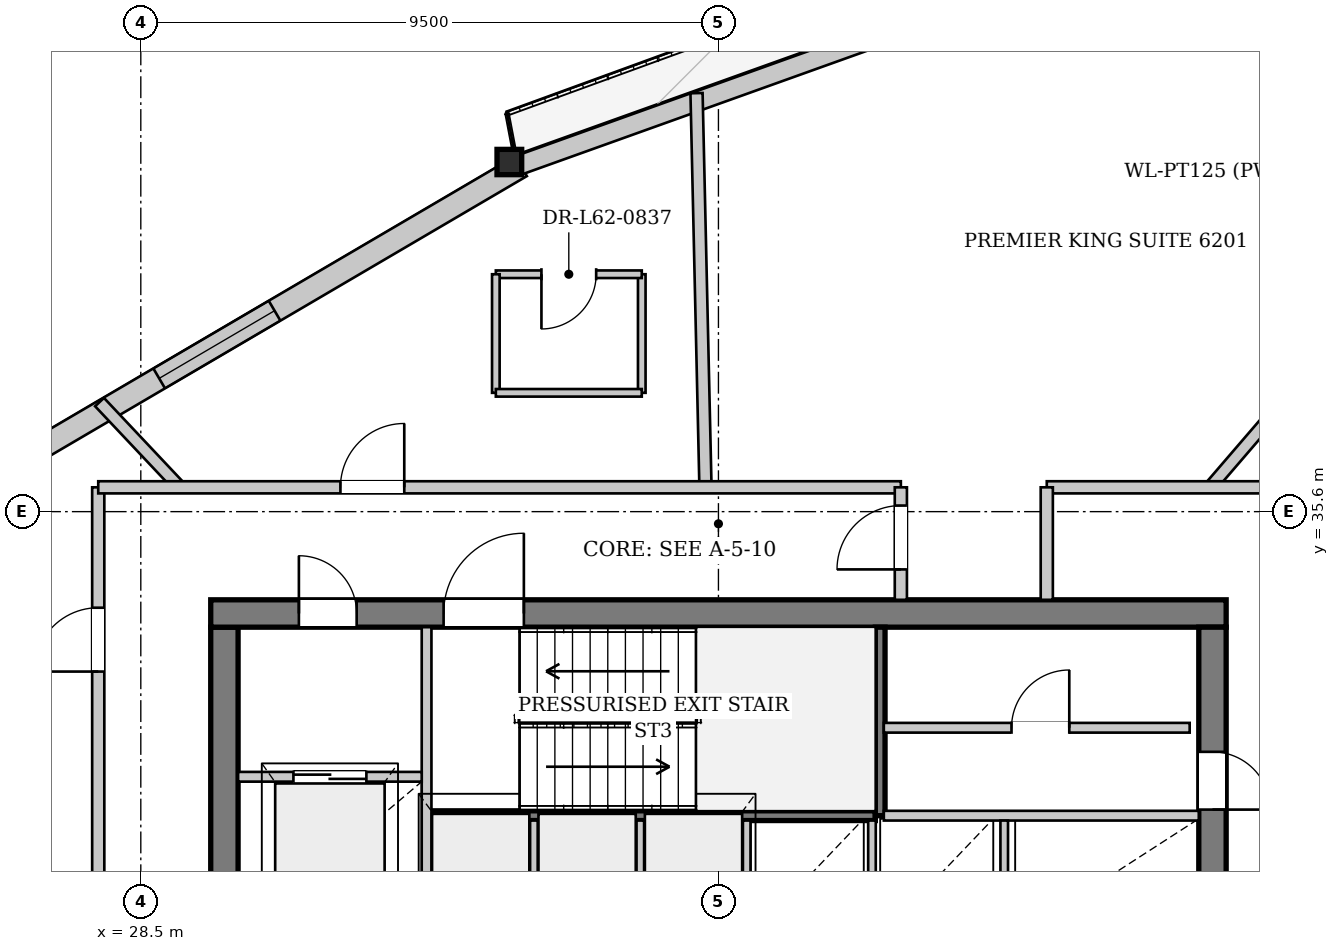
"""IFC4 building model, lengths in metres.
Left out: names, types, materials, properties, quantities, classifications, styles, units other than length and angle.
Written with IfcOpenShell. Run it as: python <this file> out.ifc"""

import sys

from ifc_helpers import new_model, si_unit, direction, frame, frame_2d, origin, origin_2d, place, context, subcontext, project, spatial, rectangle, i_section, extrude, source, transform, mapped, element, fill, save


model = new_model("IFC4")
c1 = context("Model", 3, precision=1e-05, world=origin(), true_north=direction((0.0, 1.0)))
c2 = subcontext(c1, "Body", "Model", "MODEL_VIEW")
j1 = project(units=[si_unit("LENGTHUNIT", "METRE"), si_unit("PLANEANGLEUNIT", "RADIAN")], contexts=[c1])
p1 = place(None, origin())
s1 = spatial("IfcSite", under=j1, at=p1, CompositionType="ELEMENT")
p2 = place(p1, origin())
s2 = spatial("IfcBuilding", under=s1, at=p2, CompositionType="ELEMENT")
p3 = place(p2, frame((0.0, 0.0, 234.5)))
s3 = spatial("IfcBuildingStorey", under=s2, at=p3, CompositionType="ELEMENT", Elevation=234.5)
m1 = source(origin(), c2, "Body", "SweptSolid", [
    extrude(i_section(OverallWidth=0.406, OverallDepth=0.416, WebThickness=0.027, FlangeThickness=0.042, at=origin_2d()), origin(), (0.0, 0.0, 1.0), 3.446),
])
p4 = place(p3, frame((34.657, 41.446, 0.0), z_axis=(-0.055618943406, -0.055831499877, 0.996889851867), x_axis=(0.708454075285, -0.7057569151, 0.0)))
e1 = element("IfcColumn", 1, at=p4, inside=s3, PredefinedType="COLUMN", context=c2, shape_type="MappedRepresentation", body=[
    mapped(m1, transform((0.0, 0.0, 0.0), x_axis=(1.0, 0.0, 0.0), y_axis=(0.0, 1.0, 0.0), z_axis=(0.0, 0.0, 1.0), scale=1.0)),
])
p5 = place(p3, frame((15.502, 29.99, 0.0), z_axis=(0.0, 0.0, 1.0), x_axis=(0.862571881981, 0.505934529772, 0.0)))
e2 = element("IfcWall", 2, at=p5, inside=s3, PredefinedType="SOLIDWALL", context=c2, shape_type="SweptSolid", body=[
    extrude(rectangle(XDim=22.318, YDim=0.38, at=frame_2d((11.159, 0.0))), origin(), (0.0, 0.0, 1.0), 2.872),
])
p6 = place(p5, frame((5.149, 0.0, 0.502)))
e3 = element("IfcOpeningElement", 3, at=p6, cuts=e2, PredefinedType="OPENING", context=c2, shape_type="SweptSolid", body=[
    extrude(rectangle(XDim=2.2, YDim=2.25, at=frame_2d((1.1, 1.125))), frame((0.0, 0.2, 0.0), z_axis=(0.0, -1.0, 0.0), x_axis=(1.0, 0.0, 0.0)), (0.0, 0.0, 1.0), 0.4),
])
p7 = place(p5, frame((15.419, 0.0, 0.502)))
e4 = element("IfcOpeningElement", 4, at=p7, cuts=e2, PredefinedType="OPENING", context=c2, shape_type="SweptSolid", body=[
    extrude(rectangle(XDim=2.2, YDim=2.25, at=frame_2d((1.1, 1.125))), frame((0.0, 0.2, 0.0), z_axis=(0.0, -1.0, 0.0), x_axis=(1.0, 0.0, 0.0)), (0.0, 0.0, 1.0), 0.4),
])
p8 = place(p3, frame((34.711, 41.295, 0.0), z_axis=(0.0, 0.0, 1.0), x_axis=(0.941393680714, 0.337309854455, 0.0)))
e5 = element("IfcWall", 5, at=p8, inside=s3, PredefinedType="SOLIDWALL", context=c2, shape_type="SweptSolid", body=[
    extrude(rectangle(XDim=22.318, YDim=0.32, at=frame_2d((11.159, 0.0))), origin(), (0.0, 0.0, 1.0), 2.872),
])
p9 = place(p8, frame((6.392, 0.0, 0.0)))
e6 = element("IfcOpeningElement", 6, at=p9, cuts=e5, PredefinedType="OPENING", context=c2, shape_type="SweptSolid", body=[
    extrude(rectangle(XDim=1.5, YDim=2.3, at=frame_2d((0.75, 1.15))), frame((0.0, 0.17, 0.0), z_axis=(0.0, -1.0, 0.0), x_axis=(1.0, 0.0, 0.0)), (0.0, 0.0, 1.0), 0.34),
])
p10 = place(p8, frame((15.215, 0.0, 0.402)))
e7 = element("IfcOpeningElement", 7, at=p10, cuts=e5, PredefinedType="OPENING", context=c2, shape_type="SweptSolid", body=[
    extrude(rectangle(XDim=2.6, YDim=2.35, at=frame_2d((1.3, 1.175))), frame((0.0, 0.17, 0.0), z_axis=(0.0, -1.0, 0.0), x_axis=(1.0, 0.0, 0.0)), (0.0, 0.0, 1.0), 0.34),
])
p11 = place(p3, frame((29.875, 19.5, 0.0), z_axis=(0.0, 0.0, 1.0), x_axis=(0.0, 1.0, 0.0)))
e8 = element("IfcWall", 8, at=p11, inside=s3, PredefinedType="SHEAR", context=c2, shape_type="SweptSolid", body=[
    extrude(rectangle(XDim=14.2, YDim=0.45, at=frame_2d((7.1, 0.0))), origin(), (0.0, 0.0, 1.0), 3.38),
])
p12 = place(p11, frame((7.42, 0.0, 0.0)))
e9 = element("IfcOpeningElement", 9, at=p12, cuts=e8, PredefinedType="OPENING", context=c2, shape_type="SweptSolid", body=[
    extrude(rectangle(XDim=1.6, YDim=2.2, at=frame_2d((0.8, 1.1))), frame((0.0, 0.235, 0.0), z_axis=(0.0, -1.0, 0.0), x_axis=(1.0, 0.0, 0.0)), (0.0, 0.0, 1.0), 0.47),
])
p13 = place(p3, frame((29.65, 33.925, 0.0), z_axis=(0.0, 0.0, 1.0), x_axis=(1.0, 0.0, 0.0)))
e10 = element("IfcWall", 10, at=p13, inside=s3, PredefinedType="SHEAR", context=c2, shape_type="SweptSolid", body=[
    extrude(rectangle(XDim=16.7, YDim=0.45, at=frame_2d((8.35, 0.0))), origin(), (0.0, 0.0, 1.0), 3.38),
])
p14 = place(p13, frame((1.45, 0.0, 0.0)))
e11 = element("IfcOpeningElement", 11, at=p14, cuts=e10, PredefinedType="OPENING", context=c2, shape_type="SweptSolid", body=[
    extrude(rectangle(XDim=0.95, YDim=2.1, at=frame_2d((0.475, 1.05))), frame((0.0, 0.235, 0.0), z_axis=(0.0, -1.0, 0.0), x_axis=(1.0, 0.0, 0.0)), (0.0, 0.0, 1.0), 0.47),
])
p15 = place(p13, frame((3.83, 0.0, 0.0)))
e12 = element("IfcOpeningElement", 12, at=p15, cuts=e10, PredefinedType="OPENING", context=c2, shape_type="SweptSolid", body=[
    extrude(rectangle(XDim=1.32, YDim=2.2, at=frame_2d((0.66, 1.1))), frame((0.0, 0.235, 0.0), z_axis=(0.0, -1.0, 0.0), x_axis=(1.0, 0.0, 0.0)), (0.0, 0.0, 1.0), 0.47),
])
p16 = place(p3, frame((46.125, 33.7, 0.0), z_axis=(0.0, 0.0, 1.0), x_axis=(0.0, -1.0, 0.0)))
e13 = element("IfcWall", 13, at=p16, inside=s3, PredefinedType="SHEAR", context=c2, shape_type="SweptSolid", body=[
    extrude(rectangle(XDim=14.2, YDim=0.45, at=frame_2d((7.1, 0.0))), origin(), (0.0, 0.0, 1.0), 3.38),
])
p17 = place(p16, frame((5.18, 0.0, 0.0)))
e14 = element("IfcOpeningElement", 14, at=p17, cuts=e13, PredefinedType="OPENING", context=c2, shape_type="SweptSolid", body=[
    extrude(rectangle(XDim=1.6, YDim=2.2, at=frame_2d((0.8, 1.1))), frame((0.0, 0.235, 0.0), z_axis=(0.0, -1.0, 0.0), x_axis=(1.0, 0.0, 0.0)), (0.0, 0.0, 1.0), 0.47),
])
p18 = place(p16, frame((2.05, 0.0, 0.0)))
e15 = element("IfcOpeningElement", 15, at=p18, cuts=e13, PredefinedType="OPENING", context=c2, shape_type="SweptSolid", body=[
    extrude(rectangle(XDim=0.95, YDim=2.1, at=frame_2d((0.475, 1.05))), frame((0.0, 0.235, 0.0), z_axis=(0.0, -1.0, 0.0), x_axis=(1.0, 0.0, 0.0)), (0.0, 0.0, 1.0), 0.47),
])
p19 = place(p3, frame((33.28, 30.6, 0.0), z_axis=(0.0, 0.0, 1.0), x_axis=(1.0, 0.0, 0.0)))
e16 = element("IfcWall", 16, at=p19, inside=s3, PredefinedType="PARTITIONING", context=c2, shape_type="SweptSolid", body=[
    extrude(rectangle(XDim=7.3, YDim=0.16, at=frame_2d((3.65, 0.0))), origin(), (0.0, 0.0, 1.0), 3.38),
])
p20 = place(p3, frame((40.66, 30.6, 0.0), z_axis=(0.0, 0.0, 1.0), x_axis=(0.0, 1.0, 0.0)))
e17 = element("IfcWall", 17, at=p20, inside=s3, PredefinedType="PARTITIONING", context=c2, shape_type="SweptSolid", body=[
    extrude(rectangle(XDim=3.1, YDim=0.16, at=frame_2d((1.55, 0.0))), origin(), (0.0, 0.0, 1.0), 3.38),
])
p21 = place(p3, frame((33.2, 28.44, 0.0), z_axis=(0.0, 0.0, 1.0), x_axis=(0.0, 1.0, 0.0)))
e18 = element("IfcWall", 18, at=p21, inside=s3, PredefinedType="PARTITIONING", context=c2, shape_type="SweptSolid", body=[
    extrude(rectangle(XDim=5.26, YDim=0.16, at=frame_2d((2.63, 0.0))), origin(), (0.0, 0.0, 1.0), 3.38),
])
p22 = place(p3, frame((30.1, 31.24, 0.0), z_axis=(0.0, 0.0, 1.0), x_axis=(1.0, 0.0, 0.0)))
e19 = element("IfcWall", 19, at=p22, inside=s3, PredefinedType="PARTITIONING", context=c2, shape_type="SweptSolid", body=[
    extrude(rectangle(XDim=3.02, YDim=0.16, at=frame_2d((1.51, 0.0))), origin(), (0.0, 0.0, 1.0), 3.38),
])
p23 = place(p22, frame((0.91, 0.0, 0.0)))
e20 = element("IfcOpeningElement", 20, at=p23, cuts=e19, PredefinedType="OPENING", context=c2, shape_type="SweptSolid", body=[
    extrude(rectangle(XDim=1.2, YDim=2.2, at=frame_2d((0.6, 1.1))), frame((0.0, 0.09, 0.0), z_axis=(0.0, -1.0, 0.0), x_axis=(1.0, 0.0, 0.0)), (0.0, 0.0, 1.0), 0.18),
])
p24 = place(p3, frame((40.72, 30.6, 0.0), z_axis=(0.0, 0.0, 1.0), x_axis=(1.0, 0.0, 0.0)))
e21 = element("IfcWall", 21, at=p24, inside=s3, PredefinedType="PARTITIONING", context=c2, shape_type="SweptSolid", body=[
    extrude(rectangle(XDim=5.18, YDim=0.16, at=frame_2d((2.59, 0.0))), origin(), (0.0, 0.0, 1.0), 3.38),
])
for number, where, z_axis, x_axis in (
    (22, (34.965, 28.6, 0.0), (0.0, 0.0, 1.0), (0.0, 1.0, 0.0)),
    (23, (36.715, 28.6, 0.0), (0.0, 0.0, 1.0), (0.0, 1.0, 0.0)),
    (24, (38.465, 28.6, 0.0), (0.0, 0.0, 1.0), (0.0, 1.0, 0.0)),
    (25, (40.525, 28.6, 0.0), (0.0, 0.0, 1.0), (0.0, 1.0, 0.0)),
    (26, (42.7, 28.6, 0.0), (0.0, 0.0, 1.0), (0.0, 1.0, 0.0)),
):
    element("IfcWall", number, at=place(p3, frame(where, z_axis=z_axis, x_axis=x_axis)), inside=s3, PredefinedType="PARTITIONING", context=c2, shape_type="SweptSolid", body=[
        extrude(rectangle(XDim=1.92, YDim=0.125, at=frame_2d((0.96, 0.0))), origin(), (0.0, 0.0, 1.0), 3.38),
    ])
p25 = place(p3, frame((40.72, 32.046, 0.0), z_axis=(0.0, 0.0, 1.0), x_axis=(1.0, 0.0, 0.0)))
e27 = element("IfcWall", 27, at=p25, inside=s3, PredefinedType="PARTITIONING", context=c2, shape_type="SweptSolid", body=[
    extrude(rectangle(XDim=5.03, YDim=0.16, at=frame_2d((2.515, 0.0))), origin(), (0.0, 0.0, 1.0), 3.38),
])
p26 = place(p25, frame((2.1, 0.0, 0.0)))
e28 = element("IfcOpeningElement", 28, at=p26, cuts=e27, PredefinedType="OPENING", context=c2, shape_type="SweptSolid", body=[
    extrude(rectangle(XDim=0.95, YDim=2.1, at=frame_2d((0.475, 1.05))), frame((0.0, 0.09, 0.0), z_axis=(0.0, -1.0, 0.0), x_axis=(1.0, 0.0, 0.0)), (0.0, 0.0, 1.0), 0.18),
])
p27 = place(p3, frame((46.085, 36.0, 0.0), z_axis=(0.0, 0.0, 1.0), x_axis=(0.652105460698, 0.758128266277, 0.0)))
e29 = element("IfcWall", 29, at=p27, inside=s3, PredefinedType="PARTITIONING", context=c2, shape_type="SweptSolid", body=[
    extrude(rectangle(XDim=17.597, YDim=0.2, at=frame_2d((8.799, 0.0))), origin(), (0.0, 0.0, 1.0), 2.975),
])
p28 = place(p3, frame((37.787, 36.0, 0.0), z_axis=(0.0, 0.0, 1.0), x_axis=(-0.022666666655, 0.999743078107, 0.0)))
e30 = element("IfcWall", 30, at=p28, inside=s3, PredefinedType="PARTITIONING", context=c2, shape_type="SweptSolid", body=[
    extrude(rectangle(XDim=6.484, YDim=0.2, at=frame_2d((3.242, 0.0))), origin(), (0.0, 0.0, 1.0), 3.38),
])
p29 = place(p3, frame((29.142, 36.0, 0.0), z_axis=(0.0, 0.0, 1.0), x_axis=(-0.685811478451, 0.727779235775, 0.0)))
e31 = element("IfcWall", 31, at=p29, inside=s3, PredefinedType="PARTITIONING", context=c2, shape_type="SweptSolid", body=[
    extrude(rectangle(XDim=1.926, YDim=0.2, at=frame_2d((0.963, 0.0))), origin(), (0.0, 0.0, 1.0), 3.38),
])
p30 = place(p3, frame((36.739, 37.554, 0.0), z_axis=(0.0, 0.0, 1.0), x_axis=(0.0, 1.0, 0.0)))
e32 = element("IfcWall", 32, at=p30, inside=s3, PredefinedType="PARTITIONING", context=c2, shape_type="SweptSolid", body=[
    extrude(rectangle(XDim=1.95, YDim=0.125, at=frame_2d((0.975, 0.0))), origin(), (0.0, 0.0, 1.0), 3.38),
])
p31 = place(p3, frame((36.739, 39.504, 0.0), z_axis=(0.0, 0.0, 1.0), x_axis=(-1.0, 0.0, 0.0)))
e33 = element("IfcWall", 33, at=p31, inside=s3, PredefinedType="PARTITIONING", context=c2, shape_type="SweptSolid", body=[
    extrude(rectangle(XDim=2.4, YDim=0.125, at=frame_2d((1.2, 0.0))), origin(), (0.0, 0.0, 1.0), 3.38),
])
p32 = place(p31, frame((0.75, 0.0, 0.0)))
e34 = element("IfcOpeningElement", 34, at=p32, cuts=e33, PredefinedType="OPENING", context=c2, shape_type="SweptSolid", body=[
    extrude(rectangle(XDim=0.9, YDim=2.1, at=frame_2d((0.45, 1.05))), frame((0.0, 0.073, 0.0), z_axis=(0.0, -1.0, 0.0), x_axis=(1.0, 0.0, 0.0)), (0.0, 0.0, 1.0), 0.145),
])
p33 = place(p3, frame((34.339, 39.504, 0.0), z_axis=(0.0, 0.0, 1.0), x_axis=(0.0, -1.0, 0.0)))
e35 = element("IfcWall", 35, at=p33, inside=s3, PredefinedType="PARTITIONING", context=c2, shape_type="SweptSolid", body=[
    extrude(rectangle(XDim=1.95, YDim=0.125, at=frame_2d((0.975, 0.0))), origin(), (0.0, 0.0, 1.0), 3.38),
])
p34 = place(p3, frame((34.339, 37.554, 0.0), z_axis=(0.0, 0.0, 1.0), x_axis=(1.0, 0.0, 0.0)))
e36 = element("IfcWall", 36, at=p34, inside=s3, PredefinedType="PARTITIONING", context=c2, shape_type="SweptSolid", body=[
    extrude(rectangle(XDim=2.4, YDim=0.125, at=frame_2d((1.2, 0.0))), origin(), (0.0, 0.0, 1.0), 3.38),
])
p35 = place(p3, frame((27.8, 17.2, 0.0), z_axis=(0.0, 0.0, 1.0), x_axis=(0.0, 1.0, 0.0)))
e37 = element("IfcWall", 37, at=p35, inside=s3, PredefinedType="PARTITIONING", context=c2, shape_type="SweptSolid", body=[
    extrude(rectangle(XDim=18.8, YDim=0.2, at=frame_2d((9.4, 0.0))), origin(), (0.0, 0.0, 1.0), 3.38),
])
p36 = place(p35, frame((15.77, 0.0, 0.0)))
e38 = element("IfcOpeningElement", 38, at=p36, cuts=e37, PredefinedType="OPENING", context=c2, shape_type="SweptSolid", body=[
    extrude(rectangle(XDim=1.05, YDim=2.2, at=frame_2d((0.525, 1.1))), frame((0.0, 0.11, 0.0), z_axis=(0.0, -1.0, 0.0), x_axis=(1.0, 0.0, 0.0)), (0.0, 0.0, 1.0), 0.22),
])
p37 = place(p35, frame((4.148, 0.0, 0.0)))
e39 = element("IfcOpeningElement", 39, at=p37, cuts=e37, PredefinedType="OPENING", context=c2, shape_type="SweptSolid", body=[
    extrude(rectangle(XDim=1.05, YDim=2.2, at=frame_2d((0.525, 1.1))), frame((0.0, 0.11, 0.0), z_axis=(0.0, -1.0, 0.0), x_axis=(1.0, 0.0, 0.0)), (0.0, 0.0, 1.0), 0.22),
])
p38 = place(p3, frame((27.8, 36.0, 0.0), z_axis=(0.0, 0.0, 1.0), x_axis=(1.0, 0.0, 0.0)))
e40 = element("IfcWall", 40, at=p38, inside=s3, PredefinedType="PARTITIONING", context=c2, shape_type="SweptSolid", body=[
    extrude(rectangle(XDim=13.2, YDim=0.2, at=frame_2d((6.6, 0.0))), origin(), (0.0, 0.0, 1.0), 3.38),
])
p39 = place(p38, frame((3.983, 0.0, 0.0)))
e41 = element("IfcOpeningElement", 41, at=p39, cuts=e40, PredefinedType="OPENING", context=c2, shape_type="SweptSolid", body=[
    extrude(rectangle(XDim=1.05, YDim=2.2, at=frame_2d((0.525, 1.1))), frame((0.0, 0.11, 0.0), z_axis=(0.0, -1.0, 0.0), x_axis=(1.0, 0.0, 0.0)), (0.0, 0.0, 1.0), 0.22),
])
p40 = place(p3, frame((41.0, 34.15, 0.0), z_axis=(0.0, 0.0, 1.0), x_axis=(0.0, 1.0, 0.0)))
e42 = element("IfcWall", 42, at=p40, inside=s3, PredefinedType="PARTITIONING", context=c2, shape_type="SweptSolid", body=[
    extrude(rectangle(XDim=1.85, YDim=0.2, at=frame_2d((0.925, 0.0))), origin(), (0.0, 0.0, 1.0), 3.38),
])
p41 = place(p40, frame((0.5, 0.0, 0.0)))
e43 = element("IfcOpeningElement", 43, at=p41, cuts=e42, PredefinedType="OPENING", context=c2, shape_type="SweptSolid", body=[
    extrude(rectangle(XDim=1.05, YDim=2.2, at=frame_2d((0.525, 1.1))), frame((0.0, 0.11, 0.0), z_axis=(0.0, -1.0, 0.0), x_axis=(1.0, 0.0, 0.0)), (0.0, 0.0, 1.0), 0.22),
])
p42 = place(p3, frame((43.4, 36.0, 0.0), z_axis=(0.0, 0.0, 1.0), x_axis=(1.0, 0.0, 0.0)))
e44 = element("IfcWall", 44, at=p42, inside=s3, PredefinedType="PARTITIONING", context=c2, shape_type="SweptSolid", body=[
    extrude(rectangle(XDim=4.8, YDim=0.2, at=frame_2d((2.4, 0.0))), origin(), (0.0, 0.0, 1.0), 3.38),
])
p43 = place(p3, frame((43.4, 34.15, 0.0), z_axis=(0.0, 0.0, 1.0), x_axis=(0.0, 1.0, 0.0)))
e45 = element("IfcWall", 45, at=p43, inside=s3, PredefinedType="PARTITIONING", context=c2, shape_type="SweptSolid", body=[
    extrude(rectangle(XDim=1.85, YDim=0.2, at=frame_2d((0.925, 0.0))), origin(), (0.0, 0.0, 1.0), 3.38),
])
m2 = source(origin(), c2, "Body", "SweptSolid", [
    extrude(rectangle(XDim=2.2, YDim=2.25, at=frame_2d((1.1, 1.125))), frame((0.0, 0.03, 0.0), z_axis=(0.0, -1.0, 0.0), x_axis=(1.0, 0.0, 0.0)), (0.0, 0.0, 1.0), 0.06),
])
p44 = place(p7, origin())
e46 = element("IfcWindow", 46, at=p44, inside=s3, PartitioningType="SINGLE_PANEL", PredefinedType="WINDOW", context=c2, shape_type="MappedRepresentation", body=[
    mapped(m2, transform((0.0, 0.0, 0.0), x_axis=(1.0, 0.0, 0.0), y_axis=(0.0, 1.0, 0.0), z_axis=(0.0, 0.0, 1.0), scale=1.0)),
])
fill(e4, e46)
m3 = source(origin(), c2, "Body", "SweptSolid", [
    extrude(rectangle(XDim=0.95, YDim=2.1, at=frame_2d((0.475, 1.05))), frame((0.0, 0.025, 0.0), z_axis=(0.0, -1.0, 0.0), x_axis=(1.0, 0.0, 0.0)), (0.0, 0.0, 1.0), 0.05),
])
p45 = place(p14, origin())
e47 = element("IfcDoor", 47, at=p45, inside=s3, OperationType="SINGLE_SWING_LEFT", PredefinedType="DOOR", context=c2, shape_type="MappedRepresentation", body=[
    mapped(m3, transform((0.0, 0.0, 0.0), x_axis=(1.0, 0.0, 0.0), y_axis=(0.0, 1.0, 0.0), z_axis=(0.0, 0.0, 1.0), scale=1.0)),
])
fill(e11, e47)
m4 = source(origin(), c2, "Body", "SweptSolid", [
    extrude(rectangle(XDim=1.32, YDim=2.2, at=frame_2d((0.66, 1.1))), frame((0.0, 0.025, 0.0), z_axis=(0.0, -1.0, 0.0), x_axis=(1.0, 0.0, 0.0)), (0.0, 0.0, 1.0), 0.05),
])
p46 = place(p15, origin())
e48 = element("IfcDoor", 48, at=p46, inside=s3, OperationType="SINGLE_SWING_RIGHT", PredefinedType="DOOR", context=c2, shape_type="MappedRepresentation", body=[
    mapped(m4, transform((0.0, 0.0, 0.0), x_axis=(1.0, 0.0, 0.0), y_axis=(0.0, 1.0, 0.0), z_axis=(0.0, 0.0, 1.0), scale=1.0)),
])
fill(e12, e48)
m5 = source(origin(), c2, "Body", "SweptSolid", [
    extrude(rectangle(XDim=1.2, YDim=2.2, at=frame_2d((0.6, 1.1))), frame((0.0, 0.025, 0.0), z_axis=(0.0, -1.0, 0.0), x_axis=(1.0, 0.0, 0.0)), (0.0, 0.0, 1.0), 0.05),
])
p47 = place(p23, origin())
e49 = element("IfcDoor", 49, at=p47, inside=s3, OperationType="DOUBLE_DOOR_SLIDING", PredefinedType="DOOR", context=c2, shape_type="MappedRepresentation", body=[
    mapped(m5, transform((0.0, 0.0, 0.0), x_axis=(1.0, 0.0, 0.0), y_axis=(0.0, 1.0, 0.0), z_axis=(0.0, 0.0, 1.0), scale=1.0)),
])
fill(e20, e49)
p48 = place(p26, origin())
e50 = element("IfcDoor", 50, at=p48, inside=s3, OperationType="SINGLE_SWING_RIGHT", PredefinedType="DOOR", context=c2, shape_type="MappedRepresentation", body=[
    mapped(m3, transform((0.0, 0.0, 0.0), x_axis=(1.0, 0.0, 0.0), y_axis=(0.0, 1.0, 0.0), z_axis=(0.0, 0.0, 1.0), scale=1.0)),
])
fill(e28, e50)
p49 = place(p18, origin())
e51 = element("IfcDoor", 51, at=p49, inside=s3, OperationType="SINGLE_SWING_RIGHT", PredefinedType="DOOR", context=c2, shape_type="MappedRepresentation", body=[
    mapped(m3, transform((0.0, 0.0, 0.0), x_axis=(1.0, 0.0, 0.0), y_axis=(0.0, 1.0, 0.0), z_axis=(0.0, 0.0, 1.0), scale=1.0)),
])
fill(e15, e51)
m6 = source(origin(), c2, "Body", "SweptSolid", [
    extrude(rectangle(XDim=0.9, YDim=2.1, at=frame_2d((0.45, 1.05))), frame((0.0, 0.025, 0.0), z_axis=(0.0, -1.0, 0.0), x_axis=(1.0, 0.0, 0.0)), (0.0, 0.0, 1.0), 0.05),
])
p50 = place(p32, origin())
e52 = element("IfcDoor", 52, at=p50, inside=s3, OperationType="SINGLE_SWING_RIGHT", PredefinedType="DOOR", context=c2, shape_type="MappedRepresentation", body=[
    mapped(m6, transform((0.0, 0.0, 0.0), x_axis=(1.0, 0.0, 0.0), y_axis=(0.0, 1.0, 0.0), z_axis=(0.0, 0.0, 1.0), scale=1.0)),
])
fill(e34, e52)
m7 = source(origin(), c2, "Body", "SweptSolid", [
    extrude(rectangle(XDim=1.05, YDim=2.2, at=frame_2d((0.525, 1.1))), frame((0.0, 0.025, 0.0), z_axis=(0.0, -1.0, 0.0), x_axis=(1.0, 0.0, 0.0)), (0.0, 0.0, 1.0), 0.05),
])
p51 = place(p36, origin())
e53 = element("IfcDoor", 53, at=p51, inside=s3, OperationType="SINGLE_SWING_LEFT", PredefinedType="DOOR", context=c2, shape_type="MappedRepresentation", body=[
    mapped(m7, transform((0.0, 0.0, 0.0), x_axis=(1.0, 0.0, 0.0), y_axis=(0.0, 1.0, 0.0), z_axis=(0.0, 0.0, 1.0), scale=1.0)),
])
fill(e38, e53)
p52 = place(p39, origin())
e54 = element("IfcDoor", 54, at=p52, inside=s3, OperationType="SINGLE_SWING_RIGHT", PredefinedType="DOOR", context=c2, shape_type="MappedRepresentation", body=[
    mapped(m7, transform((0.0, 0.0, 0.0), x_axis=(1.0, 0.0, 0.0), y_axis=(0.0, 1.0, 0.0), z_axis=(0.0, 0.0, 1.0), scale=1.0)),
])
fill(e41, e54)
p53 = place(p41, origin())
e55 = element("IfcDoor", 55, at=p53, inside=s3, OperationType="SINGLE_SWING_LEFT", PredefinedType="DOOR", context=c2, shape_type="MappedRepresentation", body=[
    mapped(m7, transform((0.0, 0.0, 0.0), x_axis=(1.0, 0.0, 0.0), y_axis=(0.0, 1.0, 0.0), z_axis=(0.0, 0.0, 1.0), scale=1.0)),
])
fill(e43, e55)
save(model, sys.argv[1])
